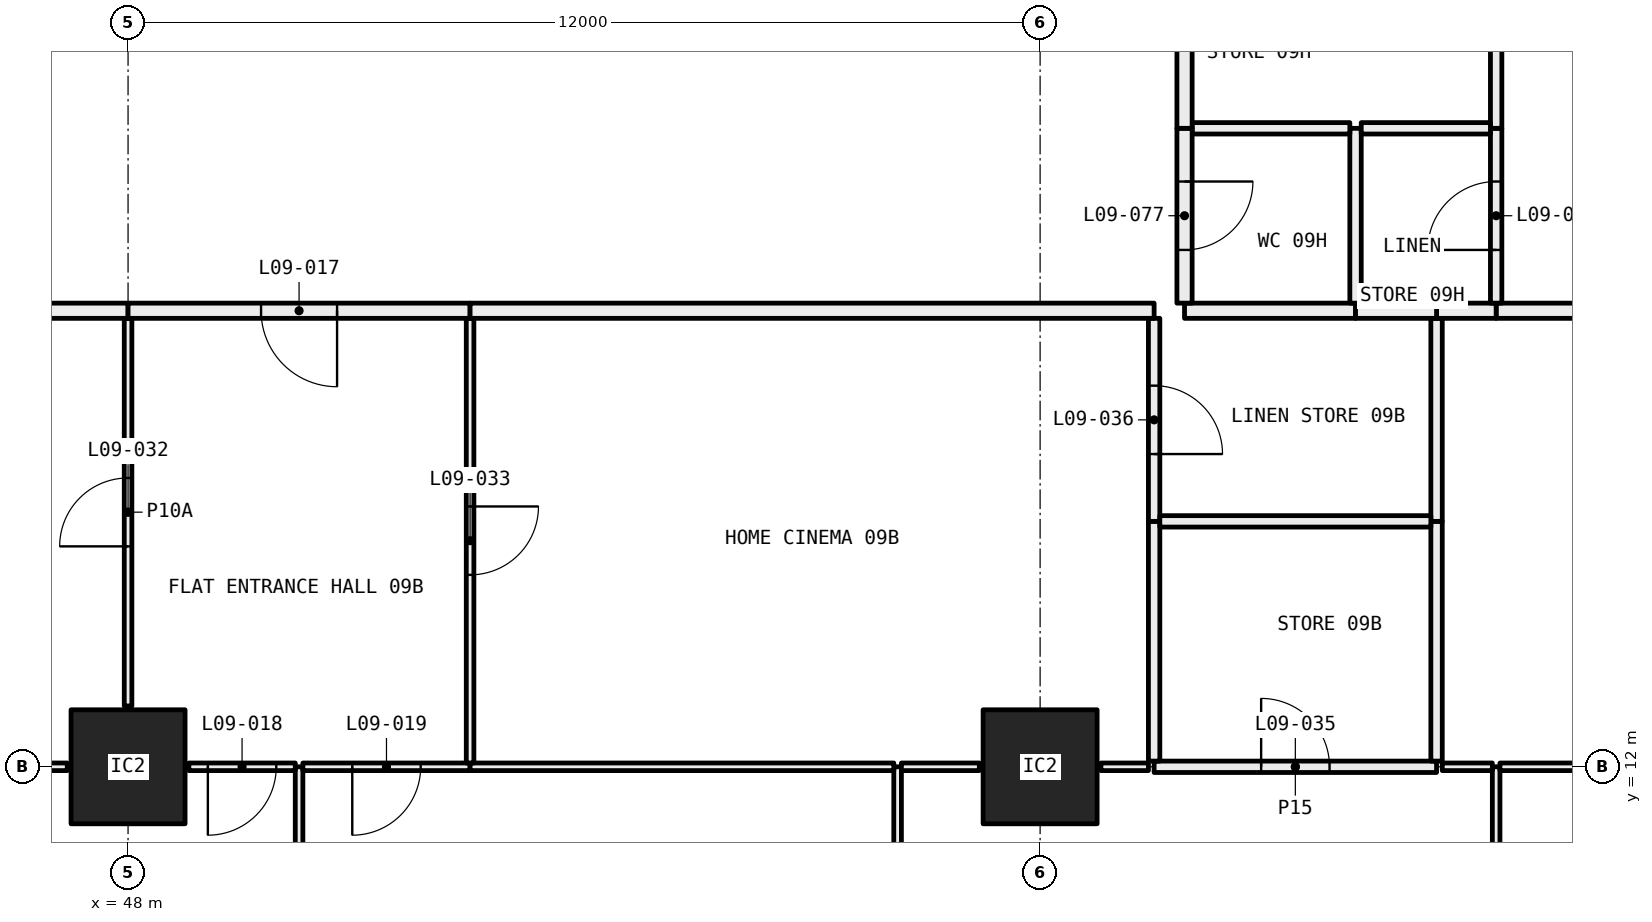
"""IFC4 building model, lengths in metres.
Left out: names, types, materials, properties, quantities, classifications, styles, units other than length and angle.
Written with IfcOpenShell. Run it as: python <this file> out.ifc"""

import sys

from ifc_helpers import new_model, si_unit, direction, frame, frame_2d, origin, origin_2d, place, context, subcontext, project, spatial, rectangle, hollow_rectangle, extrude, element, fill, save


model = new_model("IFC4")
c1 = context("Model", 3, precision=1e-05, world=origin(), true_north=direction((0.0, 1.0)))
c2 = subcontext(c1, "Body", "Model", "MODEL_VIEW")
j1 = project(units=[si_unit("LENGTHUNIT", "METRE"), si_unit("PLANEANGLEUNIT", "RADIAN")], contexts=[c1])
p1 = place(None, origin())
s1 = spatial("IfcSite", under=j1, at=p1, CompositionType="ELEMENT")
p2 = place(p1, origin())
s2 = spatial("IfcBuilding", under=s1, at=p2, CompositionType="ELEMENT")
p3 = place(p2, frame((0.0, 0.0, 43.8)))
s3 = spatial("IfcBuildingStorey", under=s2, at=p3, CompositionType="ELEMENT", Elevation=43.8)
for number, where, z_axis, x_axis in (
    (1, (48.0, 12.0, 0.0), (0.0, 0.0, 1.0), (1.0, 0.0, 0.0)),
    (2, (60.0, 12.0, 0.0), (0.0, 0.0, 1.0), (1.0, 0.0, 0.0)),
):
    element("IfcColumn", number, at=place(p3, frame(where, z_axis=z_axis, x_axis=x_axis)), inside=s3, PredefinedType="COLUMN", context=c2, shape_type="SweptSolid", body=[
        extrude(hollow_rectangle(XDim=1.5, YDim=1.5, WallThickness=0.065, at=origin_2d()), origin(), (0.0, 0.0, 1.0), 3.05),
    ])
p4 = place(p3, frame((50.25, 6.05, 0.0), z_axis=(0.0, 0.0, 1.0), x_axis=(0.0, 1.0, 0.0)))
e3 = element("IfcWall", 3, at=p4, inside=s3, PredefinedType="PARTITIONING", context=c2, shape_type="SweptSolid", body=[
    extrude(rectangle(XDim=5.95, YDim=0.1, at=frame_2d((2.975, 0.0))), origin(), (0.0, 0.0, 1.0), 2.45),
])
p5 = place(p3, frame((47.2, 12.0, 0.0), z_axis=(0.0, 0.0, 1.0), x_axis=(-1.0, 0.0, 0.0)))
e4 = element("IfcWall", 4, at=p5, inside=s3, PredefinedType="PARTITIONING", context=c2, shape_type="SweptSolid", body=[
    extrude(rectangle(XDim=3.7, YDim=0.1, at=frame_2d((1.85, 0.0))), origin(), (0.0, 0.0, 1.0), 2.45),
])
p6 = place(p3, frame((50.2, 12.0, 0.0), z_axis=(0.0, 0.0, 1.0), x_axis=(-1.0, 0.0, 0.0)))
e5 = element("IfcWall", 5, at=p6, inside=s3, PredefinedType="PARTITIONING", context=c2, shape_type="SweptSolid", body=[
    extrude(rectangle(XDim=1.4, YDim=0.1, at=frame_2d((0.7, 0.0))), origin(), (0.0, 0.0, 1.0), 2.45),
])
p7 = place(p6, frame((0.25, 0.0, 0.0)))
e6 = element("IfcOpeningElement", 6, at=p7, cuts=e5, PredefinedType="OPENING", context=c2, shape_type="SweptSolid", body=[
    extrude(rectangle(XDim=0.9, YDim=2.1, at=frame_2d((0.45, 1.05))), frame((0.0, 0.06, 0.0), z_axis=(0.0, -1.0, 0.0), x_axis=(1.0, 0.0, 0.0)), (0.0, 0.0, 1.0), 0.12),
])
p8 = place(p3, frame((58.125, 6.05, 0.0), z_axis=(0.0, 0.0, 1.0), x_axis=(0.0, 1.0, 0.0)))
e7 = element("IfcWall", 7, at=p8, inside=s3, PredefinedType="PARTITIONING", context=c2, shape_type="SweptSolid", body=[
    extrude(rectangle(XDim=5.95, YDim=0.1, at=frame_2d((2.975, 0.0))), origin(), (0.0, 0.0, 1.0), 2.45),
])
p9 = place(p8, frame((2.525, 0.0, 0.0)))
e8 = element("IfcOpeningElement", 8, at=p9, cuts=e7, PredefinedType="OPENING", context=c2, shape_type="SweptSolid", body=[
    extrude(rectangle(XDim=0.9, YDim=2.1, at=frame_2d((0.45, 1.05))), frame((0.0, 0.06, 0.0), z_axis=(0.0, -1.0, 0.0), x_axis=(1.0, 0.0, 0.0)), (0.0, 0.0, 1.0), 0.12),
])
p10 = place(p3, frame((52.5, 12.0, 0.0), z_axis=(0.0, 0.0, 1.0), x_axis=(-1.0, 0.0, 0.0)))
e9 = element("IfcWall", 9, at=p10, inside=s3, PredefinedType="PARTITIONING", context=c2, shape_type="SweptSolid", body=[
    extrude(rectangle(XDim=2.2, YDim=0.1, at=frame_2d((1.1, 0.0))), origin(), (0.0, 0.0, 1.0), 2.45),
])
p11 = place(p10, frame((0.65, 0.0, 0.0)))
e10 = element("IfcOpeningElement", 10, at=p11, cuts=e9, PredefinedType="OPENING", context=c2, shape_type="SweptSolid", body=[
    extrude(rectangle(XDim=0.9, YDim=2.1, at=frame_2d((0.45, 1.05))), frame((0.0, 0.06, 0.0), z_axis=(0.0, -1.0, 0.0), x_axis=(1.0, 0.0, 0.0)), (0.0, 0.0, 1.0), 0.12),
])
p12 = place(p3, frame((58.075, 12.0, 0.0), z_axis=(0.0, 0.0, 1.0), x_axis=(-1.0, 0.0, 0.0)))
e11 = element("IfcWall", 11, at=p12, inside=s3, PredefinedType="PARTITIONING", context=c2, shape_type="SweptSolid", body=[
    extrude(rectangle(XDim=5.575, YDim=0.1, at=frame_2d((2.788, 0.0))), origin(), (0.0, 0.0, 1.0), 2.45),
])
p13 = place(p3, frame((66.0, 6.72, 0.0), z_axis=(0.0, 0.0, 1.0), x_axis=(0.0, 1.0, 0.0)))
e12 = element("IfcWall", 12, at=p13, inside=s3, PredefinedType="PARTITIONING", context=c2, shape_type="SweptSolid", body=[
    extrude(rectangle(XDim=5.28, YDim=0.1, at=frame_2d((2.64, 0.0))), origin(), (0.0, 0.0, 1.0), 2.45),
])
p14 = place(p13, frame((2.19, 0.0, 0.0)))
e13 = element("IfcOpeningElement", 13, at=p14, cuts=e12, PredefinedType="OPENING", context=c2, shape_type="SweptSolid", body=[
    extrude(rectangle(XDim=0.9, YDim=2.1, at=frame_2d((0.45, 1.05))), frame((0.0, 0.06, 0.0), z_axis=(0.0, -1.0, 0.0), x_axis=(1.0, 0.0, 0.0)), (0.0, 0.0, 1.0), 0.12),
])
p15 = place(p3, frame((59.2, 12.0, 0.0), z_axis=(0.0, 0.0, 1.0), x_axis=(-1.0, 0.0, 0.0)))
e14 = element("IfcWall", 14, at=p15, inside=s3, PredefinedType="PARTITIONING", context=c2, shape_type="SweptSolid", body=[
    extrude(rectangle(XDim=1.025, YDim=0.1, at=frame_2d((0.512, 0.0))), origin(), (0.0, 0.0, 1.0), 2.45),
])
p16 = place(p3, frame((61.425, 12.0, 0.0), z_axis=(0.0, 0.0, 1.0), x_axis=(-1.0, 0.0, 0.0)))
e15 = element("IfcWall", 15, at=p16, inside=s3, PredefinedType="PARTITIONING", context=c2, shape_type="SweptSolid", body=[
    extrude(rectangle(XDim=0.625, YDim=0.1, at=frame_2d((0.312, 0.0))), origin(), (0.0, 0.0, 1.0), 2.45),
])
p17 = place(p3, frame((65.95, 12.0, 0.0), z_axis=(0.0, 0.0, 1.0), x_axis=(-1.0, 0.0, 0.0)))
e16 = element("IfcWall", 16, at=p17, inside=s3, PredefinedType="PARTITIONING", context=c2, shape_type="SweptSolid", body=[
    extrude(rectangle(XDim=0.659, YDim=0.1, at=frame_2d((0.33, 0.0))), origin(), (0.0, 0.0, 1.0), 2.45),
])
p18 = place(p3, frame((65.216, 12.0, 0.0), z_axis=(0.0, 0.0, 1.0), x_axis=(-1.0, 0.0, 0.0)))
e17 = element("IfcWall", 17, at=p18, inside=s3, PredefinedType="PARTITIONING", context=c2, shape_type="SweptSolid", body=[
    extrude(rectangle(XDim=3.716, YDim=0.15, at=frame_2d((1.858, 0.0))), origin(), (0.0, 0.0, 1.0), 2.45),
])
p19 = place(p18, frame((1.408, 0.0, 0.0)))
e18 = element("IfcOpeningElement", 18, at=p19, cuts=e17, PredefinedType="OPENING", context=c2, shape_type="SweptSolid", body=[
    extrude(rectangle(XDim=0.9, YDim=2.1, at=frame_2d((0.45, 1.05))), frame((0.0, 0.085, 0.0), z_axis=(0.0, -1.0, 0.0), x_axis=(1.0, 0.0, 0.0)), (0.0, 0.0, 1.0), 0.17),
])
p20 = place(p3, frame((71.28, 12.0, 0.0), z_axis=(0.0, 0.0, 1.0), x_axis=(-1.0, 0.0, 0.0)))
e19 = element("IfcWall", 19, at=p20, inside=s3, PredefinedType="PARTITIONING", context=c2, shape_type="SweptSolid", body=[
    extrude(rectangle(XDim=5.23, YDim=0.1, at=frame_2d((2.615, 0.0))), origin(), (0.0, 0.0, 1.0), 2.45),
])
p21 = place(p20, frame((2.165, 0.0, 0.0)))
e20 = element("IfcOpeningElement", 20, at=p21, cuts=e19, PredefinedType="OPENING", context=c2, shape_type="SweptSolid", body=[
    extrude(rectangle(XDim=0.9, YDim=2.1, at=frame_2d((0.45, 1.05))), frame((0.0, 0.06, 0.0), z_axis=(0.0, -1.0, 0.0), x_axis=(1.0, 0.0, 0.0)), (0.0, 0.0, 1.0), 0.12),
])
p22 = place(p3, frame((48.0, 12.8, 0.0), z_axis=(0.0, 0.0, 1.0), x_axis=(0.0, 1.0, 0.0)))
e21 = element("IfcWall", 21, at=p22, inside=s3, PredefinedType="PARTITIONING", context=c2, shape_type="SweptSolid", body=[
    extrude(rectangle(XDim=5.1, YDim=0.1, at=frame_2d((2.55, 0.0))), origin(), (0.0, 0.0, 1.0), 3.05),
])
p23 = place(p22, frame((2.1, 0.0, 0.0)))
e22 = element("IfcOpeningElement", 22, at=p23, cuts=e21, PredefinedType="OPENING", context=c2, shape_type="SweptSolid", body=[
    extrude(rectangle(XDim=0.9, YDim=2.1, at=frame_2d((0.45, 1.05))), frame((0.0, 0.06, 0.0), z_axis=(0.0, -1.0, 0.0), x_axis=(1.0, 0.0, 0.0)), (0.0, 0.0, 1.0), 0.12),
])
p24 = place(p3, frame((48.0, 18.0, 0.0), z_axis=(0.0, 0.0, 1.0), x_axis=(-1.0, 0.0, 0.0)))
e23 = element("IfcWall", 23, at=p24, inside=s3, PredefinedType="PARTITIONING", context=c2, shape_type="SweptSolid", body=[
    extrude(rectangle(XDim=1.9, YDim=0.2, at=frame_2d((0.95, 0.0))), origin(), (0.0, 0.0, 1.0), 3.05),
])
p25 = place(p3, frame((52.5, 12.05, 0.0), z_axis=(0.0, 0.0, 1.0), x_axis=(0.0, 1.0, 0.0)))
e24 = element("IfcWall", 24, at=p25, inside=s3, PredefinedType="PARTITIONING", context=c2, shape_type="SweptSolid", body=[
    extrude(rectangle(XDim=5.85, YDim=0.1, at=frame_2d((2.925, 0.0))), origin(), (0.0, 0.0, 1.0), 2.45),
])
p26 = place(p25, frame((2.475, 0.0, 0.0)))
e25 = element("IfcOpeningElement", 25, at=p26, cuts=e24, PredefinedType="OPENING", context=c2, shape_type="SweptSolid", body=[
    extrude(rectangle(XDim=0.9, YDim=2.1, at=frame_2d((0.45, 1.05))), frame((0.0, 0.06, 0.0), z_axis=(0.0, -1.0, 0.0), x_axis=(1.0, 0.0, 0.0)), (0.0, 0.0, 1.0), 0.12),
])
p27 = place(p3, frame((52.5, 18.0, 0.0), z_axis=(0.0, 0.0, 1.0), x_axis=(-1.0, 0.0, 0.0)))
e26 = element("IfcWall", 26, at=p27, inside=s3, PredefinedType="PARTITIONING", context=c2, shape_type="SweptSolid", body=[
    extrude(rectangle(XDim=4.5, YDim=0.2, at=frame_2d((2.25, 0.0))), origin(), (0.0, 0.0, 1.0), 3.05),
])
p28 = place(p27, frame((1.75, 0.0, 0.0)))
e27 = element("IfcOpeningElement", 27, at=p28, cuts=e26, PredefinedType="OPENING", context=c2, shape_type="SweptSolid", body=[
    extrude(rectangle(XDim=1.0, YDim=2.1, at=frame_2d((0.5, 1.05))), frame((0.0, 0.11, 0.0), z_axis=(0.0, -1.0, 0.0), x_axis=(1.0, 0.0, 0.0)), (0.0, 0.0, 1.0), 0.22),
])
p29 = place(p3, frame((61.5, 12.075, 0.0), z_axis=(0.0, 0.0, 1.0), x_axis=(0.0, 1.0, 0.0)))
e28 = element("IfcWall", 28, at=p29, inside=s3, PredefinedType="PARTITIONING", context=c2, shape_type="SweptSolid", body=[
    extrude(rectangle(XDim=3.154, YDim=0.15, at=frame_2d((1.577, 0.0))), origin(), (0.0, 0.0, 1.0), 2.45),
])
p30 = place(p3, frame((61.5, 15.229, 0.0), z_axis=(0.0, 0.0, 1.0), x_axis=(0.0, 1.0, 0.0)))
e29 = element("IfcWall", 29, at=p30, inside=s3, PredefinedType="PARTITIONING", context=c2, shape_type="SweptSolid", body=[
    extrude(rectangle(XDim=2.671, YDim=0.15, at=frame_2d((1.335, 0.0))), origin(), (0.0, 0.0, 1.0), 3.05),
])
p31 = place(p30, frame((0.885, 0.0, 0.0)))
e30 = element("IfcOpeningElement", 30, at=p31, cuts=e29, PredefinedType="OPENING", context=c2, shape_type="SweptSolid", body=[
    extrude(rectangle(XDim=0.9, YDim=2.1, at=frame_2d((0.45, 1.05))), frame((0.0, 0.085, 0.0), z_axis=(0.0, -1.0, 0.0), x_axis=(1.0, 0.0, 0.0)), (0.0, 0.0, 1.0), 0.17),
])
p32 = place(p3, frame((61.5, 18.0, 0.0), z_axis=(0.0, 0.0, 1.0), x_axis=(-1.0, 0.0, 0.0)))
e31 = element("IfcWall", 31, at=p32, inside=s3, PredefinedType="PARTITIONING", context=c2, shape_type="SweptSolid", body=[
    extrude(rectangle(XDim=9.0, YDim=0.2, at=frame_2d((4.5, 0.0))), origin(), (0.0, 0.0, 1.0), 3.05),
])
p33 = place(p3, frame((65.216, 15.229, 0.0), z_axis=(0.0, 0.0, 1.0), x_axis=(0.0, -1.0, 0.0)))
e32 = element("IfcWall", 32, at=p33, inside=s3, PredefinedType="PARTITIONING", context=c2, shape_type="SweptSolid", body=[
    extrude(rectangle(XDim=3.154, YDim=0.15, at=frame_2d((1.577, 0.0))), origin(), (0.0, 0.0, 1.0), 2.45),
])
p34 = place(p3, frame((65.216, 17.9, 0.0), z_axis=(0.0, 0.0, 1.0), x_axis=(0.0, -1.0, 0.0)))
e33 = element("IfcWall", 33, at=p34, inside=s3, PredefinedType="PARTITIONING", context=c2, shape_type="SweptSolid", body=[
    extrude(rectangle(XDim=2.671, YDim=0.15, at=frame_2d((1.335, 0.0))), origin(), (0.0, 0.0, 1.0), 3.05),
])
p35 = place(p3, frame((71.28, 18.0, 0.0), z_axis=(0.0, 0.0, 1.0), x_axis=(-1.0, 0.0, 0.0)))
e34 = element("IfcWall", 34, at=p35, inside=s3, PredefinedType="PARTITIONING", context=c2, shape_type="SweptSolid", body=[
    extrude(rectangle(XDim=5.28, YDim=0.2, at=frame_2d((2.64, 0.0))), origin(), (0.0, 0.0, 1.0), 3.05),
])
p36 = place(p3, frame((66.0, 18.0, 0.0), z_axis=(0.0, 0.0, 1.0), x_axis=(-1.0, 0.0, 0.0)))
e35 = element("IfcWall", 35, at=p36, inside=s3, PredefinedType="PARTITIONING", context=c2, shape_type="SweptSolid", body=[
    extrude(rectangle(XDim=0.784, YDim=0.2, at=frame_2d((0.392, 0.0))), origin(), (0.0, 0.0, 1.0), 3.05),
])
p37 = place(p3, frame((65.141, 15.229, 0.0), z_axis=(0.0, 0.0, 1.0), x_axis=(-1.0, 0.0, 0.0)))
e36 = element("IfcWall", 36, at=p37, inside=s3, PredefinedType="PARTITIONING", context=c2, shape_type="SweptSolid", body=[
    extrude(rectangle(XDim=3.566, YDim=0.15, at=frame_2d((1.783, 0.0))), origin(), (0.0, 0.0, 1.0), 3.05),
])
p38 = place(p3, frame((64.15, 18.0, 0.0), z_axis=(0.0, 0.0, 1.0), x_axis=(-1.0, 0.0, 0.0)))
e37 = element("IfcWall", 37, at=p38, inside=s3, PredefinedType="PARTITIONING", context=c2, shape_type="SweptSolid", body=[
    extrude(rectangle(XDim=2.25, YDim=0.2, at=frame_2d((1.125, 0.0))), origin(), (0.0, 0.0, 1.0), 3.05),
])
p39 = place(p3, frame((65.216, 18.0, 0.0), z_axis=(0.0, 0.0, 1.0), x_axis=(-1.0, 0.0, 0.0)))
e38 = element("IfcWall", 38, at=p39, inside=s3, PredefinedType="PARTITIONING", context=c2, shape_type="SweptSolid", body=[
    extrude(rectangle(XDim=1.066, YDim=0.2, at=frame_2d((0.533, 0.0))), origin(), (0.0, 0.0, 1.0), 3.05),
])
p40 = place(p3, frame((66.0, 20.4, 0.0), z_axis=(0.0, 0.0, 1.0), x_axis=(0.0, -1.0, 0.0)))
e39 = element("IfcWall", 39, at=p40, inside=s3, PredefinedType="PARTITIONING", context=c2, shape_type="SweptSolid", body=[
    extrude(rectangle(XDim=2.3, YDim=0.15, at=frame_2d((1.15, 0.0))), origin(), (0.0, 0.0, 1.0), 3.05),
])
p41 = place(p40, frame((0.7, 0.0, 0.0)))
e40 = element("IfcOpeningElement", 40, at=p41, cuts=e39, PredefinedType="OPENING", context=c2, shape_type="SweptSolid", body=[
    extrude(rectangle(XDim=0.9, YDim=2.1, at=frame_2d((0.45, 1.05))), frame((0.0, 0.085, 0.0), z_axis=(0.0, -1.0, 0.0), x_axis=(1.0, 0.0, 0.0)), (0.0, 0.0, 1.0), 0.17),
])
p42 = place(p3, frame((66.0, 22.5, 0.0), z_axis=(0.0, 0.0, 1.0), x_axis=(0.0, -1.0, 0.0)))
e41 = element("IfcWall", 41, at=p42, inside=s3, PredefinedType="PARTITIONING", context=c2, shape_type="SweptSolid", body=[
    extrude(rectangle(XDim=2.1, YDim=0.15, at=frame_2d((1.05, 0.0))), origin(), (0.0, 0.0, 1.0), 3.05),
])
p43 = place(p3, frame((64.15, 18.1, 0.0), z_axis=(0.0, 0.0, 1.0), x_axis=(0.0, 1.0, 0.0)))
e42 = element("IfcWall", 42, at=p43, inside=s3, PredefinedType="PARTITIONING", context=c2, shape_type="SweptSolid", body=[
    extrude(rectangle(XDim=2.3, YDim=0.15, at=frame_2d((1.15, 0.0))), origin(), (0.0, 0.0, 1.0), 3.05),
])
p44 = place(p3, frame((64.075, 20.4, 0.0), z_axis=(0.0, 0.0, 1.0), x_axis=(-1.0, 0.0, 0.0)))
e43 = element("IfcWall", 43, at=p44, inside=s3, PredefinedType="PARTITIONING", context=c2, shape_type="SweptSolid", body=[
    extrude(rectangle(XDim=2.075, YDim=0.15, at=frame_2d((1.038, 0.0))), origin(), (0.0, 0.0, 1.0), 3.05),
])
p45 = place(p3, frame((61.9, 20.4, 0.0), z_axis=(0.0, 0.0, 1.0), x_axis=(0.0, -1.0, 0.0)))
e44 = element("IfcWall", 44, at=p45, inside=s3, PredefinedType="PARTITIONING", context=c2, shape_type="SweptSolid", body=[
    extrude(rectangle(XDim=2.3, YDim=0.2, at=frame_2d((1.15, 0.0))), origin(), (0.0, 0.0, 1.0), 3.05),
])
p46 = place(p45, frame((0.7, 0.0, 0.0)))
e45 = element("IfcOpeningElement", 45, at=p46, cuts=e44, PredefinedType="OPENING", context=c2, shape_type="SweptSolid", body=[
    extrude(rectangle(XDim=0.9, YDim=2.1, at=frame_2d((0.45, 1.05))), frame((0.0, 0.11, 0.0), z_axis=(0.0, -1.0, 0.0), x_axis=(1.0, 0.0, 0.0)), (0.0, 0.0, 1.0), 0.22),
])
p47 = place(p3, frame((65.925, 20.4, 0.0), z_axis=(0.0, 0.0, 1.0), x_axis=(-1.0, 0.0, 0.0)))
e46 = element("IfcWall", 46, at=p47, inside=s3, PredefinedType="PARTITIONING", context=c2, shape_type="SweptSolid", body=[
    extrude(rectangle(XDim=1.7, YDim=0.15, at=frame_2d((0.85, 0.0))), origin(), (0.0, 0.0, 1.0), 3.05),
])
p48 = place(p3, frame((61.9, 22.5, 0.0), z_axis=(0.0, 0.0, 1.0), x_axis=(0.0, -1.0, 0.0)))
e47 = element("IfcWall", 47, at=p48, inside=s3, PredefinedType="PARTITIONING", context=c2, shape_type="SweptSolid", body=[
    extrude(rectangle(XDim=2.1, YDim=0.2, at=frame_2d((1.05, 0.0))), origin(), (0.0, 0.0, 1.0), 3.05),
])
p49 = place(p28, origin())
e48 = element("IfcDoor", 48, at=p49, inside=s3, OperationType="SINGLE_SWING_RIGHT", PredefinedType="DOOR", context=c2, shape_type="SweptSolid", body=[
    extrude(rectangle(XDim=1.0, YDim=2.1, at=frame_2d((0.5, 1.05))), frame((0.0, 0.025, 0.0), z_axis=(0.0, -1.0, 0.0), x_axis=(1.0, 0.0, 0.0)), (0.0, 0.0, 1.0), 0.05),
])
fill(e27, e48)
p50 = place(p7, origin())
e49 = element("IfcDoor", 49, at=p50, inside=s3, OperationType="SINGLE_SWING_LEFT", PredefinedType="DOOR", context=c2, shape_type="SweptSolid", body=[
    extrude(rectangle(XDim=0.9, YDim=2.1, at=frame_2d((0.45, 1.05))), frame((0.0, 0.025, 0.0), z_axis=(0.0, -1.0, 0.0), x_axis=(1.0, 0.0, 0.0)), (0.0, 0.0, 1.0), 0.05),
])
fill(e6, e49)
p51 = place(p11, origin())
e50 = element("IfcDoor", 50, at=p51, inside=s3, OperationType="SINGLE_SWING_LEFT", PredefinedType="DOOR", context=c2, shape_type="SweptSolid", body=[
    extrude(rectangle(XDim=0.9, YDim=2.1, at=frame_2d((0.45, 1.05))), frame((0.0, 0.025, 0.0), z_axis=(0.0, -1.0, 0.0), x_axis=(1.0, 0.0, 0.0)), (0.0, 0.0, 1.0), 0.05),
])
fill(e10, e50)
p52 = place(p23, origin())
e51 = element("IfcDoor", 51, at=p52, inside=s3, OperationType="SINGLE_SWING_RIGHT", PredefinedType="DOOR", context=c2, shape_type="SweptSolid", body=[
    extrude(rectangle(XDim=0.9, YDim=2.1, at=frame_2d((0.45, 1.05))), frame((0.0, 0.025, 0.0), z_axis=(0.0, -1.0, 0.0), x_axis=(1.0, 0.0, 0.0)), (0.0, 0.0, 1.0), 0.05),
])
fill(e22, e51)
p53 = place(p26, frame((0.9, 0.0, 0.0), x_axis=(-1.0, 0.0, 0.0)))
e52 = element("IfcDoor", 52, at=p53, inside=s3, OperationType="SINGLE_SWING_RIGHT", PredefinedType="DOOR", context=c2, shape_type="SweptSolid", body=[
    extrude(rectangle(XDim=0.9, YDim=2.1, at=frame_2d((0.45, 1.05))), frame((0.0, 0.025, 0.0), z_axis=(0.0, -1.0, 0.0), x_axis=(1.0, 0.0, 0.0)), (0.0, 0.0, 1.0), 0.05),
])
fill(e25, e52)
p54 = place(p19, frame((0.9, 0.0, 0.0), x_axis=(-1.0, 0.0, 0.0)))
e53 = element("IfcDoor", 53, at=p54, inside=s3, OperationType="SINGLE_SWING_RIGHT", PredefinedType="DOOR", context=c2, shape_type="SweptSolid", body=[
    extrude(rectangle(XDim=0.9, YDim=2.1, at=frame_2d((0.45, 1.05))), frame((0.0, 0.025, 0.0), z_axis=(0.0, -1.0, 0.0), x_axis=(1.0, 0.0, 0.0)), (0.0, 0.0, 1.0), 0.05),
])
fill(e18, e53)
p55 = place(p31, frame((0.9, 0.0, 0.0), x_axis=(-1.0, 0.0, 0.0)))
e54 = element("IfcDoor", 54, at=p55, inside=s3, OperationType="SINGLE_SWING_LEFT", PredefinedType="DOOR", context=c2, shape_type="SweptSolid", body=[
    extrude(rectangle(XDim=0.9, YDim=2.1, at=frame_2d((0.45, 1.05))), frame((0.0, 0.025, 0.0), z_axis=(0.0, -1.0, 0.0), x_axis=(1.0, 0.0, 0.0)), (0.0, 0.0, 1.0), 0.05),
])
fill(e30, e54)
p56 = place(p41, frame((0.9, 0.0, 0.0), x_axis=(-1.0, 0.0, 0.0)))
e55 = element("IfcDoor", 55, at=p56, inside=s3, OperationType="SINGLE_SWING_RIGHT", PredefinedType="DOOR", context=c2, shape_type="SweptSolid", body=[
    extrude(rectangle(XDim=0.9, YDim=2.1, at=frame_2d((0.45, 1.05))), frame((0.0, 0.025, 0.0), z_axis=(0.0, -1.0, 0.0), x_axis=(1.0, 0.0, 0.0)), (0.0, 0.0, 1.0), 0.05),
])
fill(e40, e55)
p57 = place(p46, origin())
e56 = element("IfcDoor", 56, at=p57, inside=s3, OperationType="SINGLE_SWING_RIGHT", PredefinedType="DOOR", context=c2, shape_type="SweptSolid", body=[
    extrude(rectangle(XDim=0.9, YDim=2.1, at=frame_2d((0.45, 1.05))), frame((0.0, 0.025, 0.0), z_axis=(0.0, -1.0, 0.0), x_axis=(1.0, 0.0, 0.0)), (0.0, 0.0, 1.0), 0.05),
])
fill(e45, e56)
save(model, sys.argv[1])
